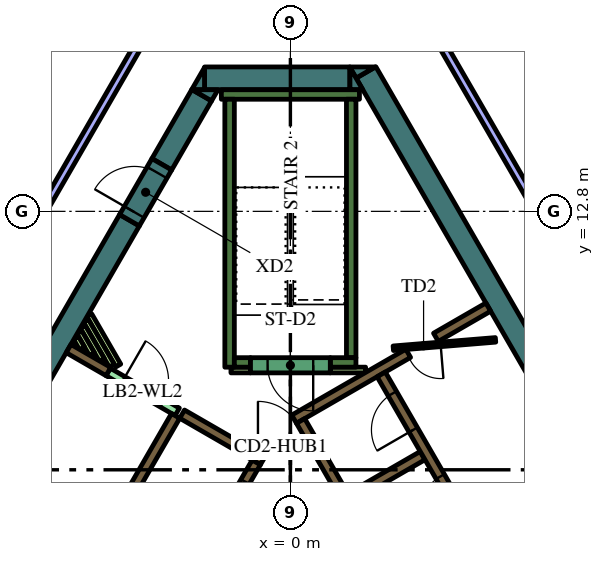
"""IFC4 building model, lengths in metres.
Left out: names, types, materials, properties, quantities, classifications, styles, units other than length and angle.
Written with IfcOpenShell. Run it as: python <this file> out.ifc"""

import sys

from ifc_helpers import new_model, si_unit, direction, frame, frame_2d, origin, place, context, subcontext, project, spatial, polyline, rectangle, outline, extrude, element, fill, save


model = new_model("IFC4")
c1 = context("Model", 3, precision=1e-05, world=origin(), true_north=direction((0.0, 1.0)))
c2 = subcontext(c1, "Body", "Model", "MODEL_VIEW")
j1 = project(units=[si_unit("LENGTHUNIT", "METRE"), si_unit("PLANEANGLEUNIT", "RADIAN")], contexts=[c1])
p1 = place(None, origin())
s1 = spatial("IfcSite", under=j1, at=p1, CompositionType="ELEMENT")
p2 = place(p1, origin())
s2 = spatial("IfcBuilding", under=s1, at=p2, CompositionType="ELEMENT")
p3 = place(p2, frame((0.0, 0.0, 271.2)))
s3 = spatial("IfcBuildingStorey", under=s2, at=p3, CompositionType="ELEMENT", Elevation=271.2)
p4 = place(p3, frame((1.989, 16.456, 0.0), z_axis=(0.0, 0.0, 1.0), x_axis=(0.49999102663, -0.8660305845, 0.0)))
e1 = element("IfcWall", 1, at=p4, inside=s3, PredefinedType="SOLIDWALL", context=c2, shape_type="SweptSolid", body=[
    extrude(rectangle(XDim=12.406, YDim=0.6, at=frame_2d((6.203, 0.0))), origin(), (0.0, 0.0, 1.0), 4.2),
])
p5 = place(p3, origin())
e2 = element("IfcWall", 2, at=p5, inside=s3, PredefinedType="SOLIDWALL", context=c2, shape_type="SweptSolid", body=[
    extrude(outline(polyline([(1.559, 16.6), (2.235, 16.6), (1.728, 16.307), (1.559, 16.6)])), origin(), (0.0, 0.0, 1.0), 4.2),
])
p6 = place(p3, frame((-2.258, 16.3, 0.0), z_axis=(0.0, 0.0, 1.0), x_axis=(1.0, 0.0, 0.0)))
e3 = element("IfcWall", 3, at=p6, inside=s3, PredefinedType="SOLIDWALL", context=c2, shape_type="SweptSolid", body=[
    extrude(rectangle(XDim=3.823, YDim=0.6, at=frame_2d((1.912, 0.0))), origin(), (0.0, 0.0, 1.0), 4.2),
])
e4 = element("IfcWall", 4, at=p5, inside=s3, PredefinedType="SOLIDWALL", context=c2, shape_type="SweptSolid", body=[
    extrude(outline(polyline([(1.905, 16.0), (1.567, 16.0), (1.567, 16.585), (1.905, 16.0)])), origin(), (0.0, 0.0, 1.0), 4.2),
])
e5 = element("IfcWall", 5, at=p5, inside=s3, PredefinedType="SOLIDWALL", context=c2, shape_type="SweptSolid", body=[
    extrude(outline(polyline([(-2.598, 16.0), (-2.26, 16.585), (-2.26, 16.0), (-2.598, 16.0)])), origin(), (0.0, 0.0, 1.0), 4.2),
])
p7 = place(p3, frame((-2.335, 15.855, 0.0), z_axis=(0.0, 0.0, 1.0), x_axis=(-0.499980971027, -0.866036389889, 0.0)))
e6 = element("IfcWall", 6, at=p7, inside=s3, PredefinedType="SOLIDWALL", context=c2, shape_type="SweptSolid", body=[
    extrude(rectangle(XDim=2.098, YDim=0.6, at=frame_2d((1.049, 0.0))), origin(), (0.0, 0.0, 1.0), 4.2),
])
e7 = element("IfcWall", 7, at=p5, inside=s3, PredefinedType="SOLIDWALL", context=c2, shape_type="SweptSolid", body=[
    extrude(outline(polyline([(-1.905, 16.0), (-2.074, 15.707), (-2.581, 16.0), (-1.905, 16.0)])), origin(), (0.0, 0.0, 1.0), 4.2),
])
p8 = place(p3, frame((-4.234, 12.566, 0.0), z_axis=(0.0, 0.0, 1.0), x_axis=(-0.499998841866, -0.866026072432, 0.0)))
e8 = element("IfcWall", 8, at=p8, inside=s3, PredefinedType="SOLIDWALL", context=c2, shape_type="SweptSolid", body=[
    extrude(rectangle(XDim=16.694, YDim=0.6, at=frame_2d((8.347, 0.0))), origin(), (0.0, 0.0, 1.0), 4.2),
])
p9 = place(p3, frame((-1.817, 15.875, 0.0), z_axis=(0.0, 0.0, 1.0), x_axis=(1.0, 0.0, 0.0)))
e9 = element("IfcWall", 9, at=p9, inside=s3, PredefinedType="SOLIDWALL", context=c2, shape_type="SweptSolid", body=[
    extrude(rectangle(XDim=3.634, YDim=0.25, at=frame_2d((1.817, 0.0))), origin(), (0.0, 0.0, 1.0), 4.2),
])
p10 = place(p3, frame((1.6, 8.95, 0.0), z_axis=(0.0, 0.0, 1.0), x_axis=(0.0, 1.0, 0.0)))
e10 = element("IfcWall", 10, at=p10, inside=s3, PredefinedType="SOLIDWALL", context=c2, shape_type="SweptSolid", body=[
    extrude(rectangle(XDim=6.8, YDim=0.25, at=frame_2d((3.4, 0.0))), origin(), (0.0, 0.0, 1.0), 4.2),
])
p11 = place(p3, frame((1.05, 8.825, 0.0), z_axis=(0.0, 0.0, 1.0), x_axis=(1.0, 0.0, 0.0)))
e11 = element("IfcWall", 11, at=p11, inside=s3, PredefinedType="SOLIDWALL", context=c2, shape_type="SweptSolid", body=[
    extrude(rectangle(XDim=0.675, YDim=0.25, at=frame_2d((0.337, 0.0))), origin(), (0.0, 0.0, 1.0), 4.2),
])
p12 = place(p3, frame((-1.6, 8.7, 0.0), z_axis=(0.0, 0.0, 1.0), x_axis=(0.0, 1.0, 0.0)))
e12 = element("IfcWall", 12, at=p12, inside=s3, PredefinedType="SOLIDWALL", context=c2, shape_type="SweptSolid", body=[
    extrude(rectangle(XDim=7.05, YDim=0.25, at=frame_2d((3.525, 0.0))), origin(), (0.0, 0.0, 1.0), 4.2),
])
p13 = place(p3, frame((-1.475, 8.825, 0.0), z_axis=(0.0, 0.0, 1.0), x_axis=(1.0, 0.0, 0.0)))
e13 = element("IfcWall", 13, at=p13, inside=s3, PredefinedType="SOLIDWALL", context=c2, shape_type="SweptSolid", body=[
    extrude(rectangle(XDim=0.425, YDim=0.25, at=frame_2d((0.212, 0.0))), origin(), (0.0, 0.0, 1.0), 4.2),
])
p14 = place(p3, frame((3.1, 9.064, 0.0), z_axis=(0.0, 0.0, 1.0), x_axis=(-0.866033137035, -0.499986605379, 0.0)))
e14 = element("IfcWall", 14, at=p14, inside=s3, PredefinedType="SOLIDWALL", context=c2, shape_type="SweptSolid", body=[
    extrude(rectangle(XDim=3.467, YDim=0.25, at=frame_2d((1.733, 0.0))), origin(), (0.0, 0.0, 1.0), 4.2),
])
p15 = place(p3, frame((0.268, 7.285, 0.0), z_axis=(0.0, 0.0, 1.0), x_axis=(0.500098681536, -0.865968422476, 0.0)))
e15 = element("IfcWall", 15, at=p15, inside=s3, PredefinedType="SOLIDWALL", context=c2, shape_type="SweptSolid", body=[
    extrude(rectangle(XDim=0.636, YDim=0.25, at=frame_2d((0.318, 0.0))), origin(), (0.0, 0.0, 1.0), 4.2),
])
p16 = place(p3, frame((5.97, -2.591, 0.0), z_axis=(0.0, 0.0, 1.0), x_axis=(-0.499994469932, 0.866028596547, 0.0)))
e16 = element("IfcWall", 16, at=p16, inside=s3, PredefinedType="SOLIDWALL", context=c2, shape_type="SweptSolid", body=[
    extrude(rectangle(XDim=10.488, YDim=0.25, at=frame_2d((5.244, 0.0))), origin(), (0.0, 0.0, 1.0), 4.2),
])
p17 = place(p3, frame((1.574, 5.274, 0.0), z_axis=(0.0, 0.0, 1.0), x_axis=(0.866028486751, 0.499994660107, 0.0)))
e17 = element("IfcWall", 17, at=p17, inside=s3, PredefinedType="SOLIDWALL", context=c2, shape_type="SweptSolid", body=[
    extrude(rectangle(XDim=2.2, YDim=0.25, at=frame_2d((1.1, 0.0))), origin(), (0.0, 0.0, 1.0), 4.2),
])
p18 = place(p3, frame((3.83, 9.486, 0.0), z_axis=(0.0, 0.0, 1.0), x_axis=(0.865986202621, 0.500067892261, 0.0)))
e18 = element("IfcWall", 18, at=p18, inside=s3, PredefinedType="SOLIDWALL", context=c2, shape_type="SweptSolid", body=[
    extrude(rectangle(XDim=1.591, YDim=0.25, at=frame_2d((0.795, 0.0))), origin(), (0.0, 0.0, 1.0), 4.2),
])
p19 = place(p3, frame((-3.02, 7.419, 0.0), z_axis=(0.0, 0.0, 1.0), x_axis=(-0.500022956343, -0.866012149528, 0.0)))
e19 = element("IfcWall", 19, at=p19, inside=s3, PredefinedType="SOLIDWALL", context=c2, shape_type="SweptSolid", body=[
    extrude(rectangle(XDim=10.08, YDim=0.25, at=frame_2d((5.04, 0.0))), origin(), (0.0, 0.0, 1.0), 4.2),
])
e20 = element("IfcWall", 20, at=p5, inside=s3, PredefinedType="SOLIDWALL", context=c2, shape_type="SweptSolid", body=[
    extrude(outline(polyline([(-2.912, 7.356), (-2.787, 7.573), (-1.232, 6.675), (-1.303, 6.675), (-1.304, 6.675), (-1.304, 6.675), (-1.304, 6.525), (-1.304, 6.525), (-1.303, 6.525), (-0.971, 6.525), (-0.665, 6.348), (-0.79, 6.132), (-1.007, 6.257), (-1.007, 6.257), (-2.912, 7.356)])), origin(), (0.0, 0.0, 1.0), 4.2),
])
p20 = place(p3, frame((-5.837, 9.19, 0.0), z_axis=(0.0, 0.0, 1.0), x_axis=(0.866024298998, -0.500001913541, 0.0)))
e21 = element("IfcWall", 21, at=p20, inside=s3, PredefinedType="SOLIDWALL", context=c2, shape_type="SweptSolid", body=[
    extrude(rectangle(XDim=1.21, YDim=0.25, at=frame_2d((0.605, 0.0))), origin(), (0.0, 0.0, 1.0), 4.2),
])
p21 = place(p3, frame((-5.294, 10.067, 0.0), z_axis=(0.0, 0.0, 1.0), x_axis=(0.500054140411, -0.865994143547, 0.0)))
e22 = element("IfcWall", 22, at=p21, inside=s3, PredefinedType="PARTITIONING", context=c2, shape_type="SweptSolid", body=[
    extrude(rectangle(XDim=1.529, YDim=0.15, at=frame_2d((0.765, 0.0))), origin(), (0.0, 0.0, 1.0), 3.55),
])
p22 = place(p3, frame((-5.381, 9.917, 0.0), z_axis=(0.0, 0.0, 1.0), x_axis=(0.500136970483, -0.865946309396, 0.0)))
e23 = element("IfcWall", 23, at=p22, inside=s3, PredefinedType="PARTITIONING", context=c2, shape_type="SweptSolid", body=[
    extrude(rectangle(XDim=1.359, YDim=0.15, at=frame_2d((0.68, 0.0))), origin(), (0.0, 0.0, 1.0), 3.55),
])
p23 = place(p3, frame((-5.467, 9.767, 0.0), z_axis=(0.0, 0.0, 1.0), x_axis=(0.500168849293, -0.86592789665, 0.0)))
e24 = element("IfcWall", 24, at=p23, inside=s3, PredefinedType="PARTITIONING", context=c2, shape_type="SweptSolid", body=[
    extrude(rectangle(XDim=1.01, YDim=0.15, at=frame_2d((0.505, 0.0))), origin(), (0.0, 0.0, 1.0), 3.55),
])
p24 = place(p3, frame((-5.554, 9.617, 0.0), z_axis=(0.0, 0.0, 1.0), x_axis=(0.500253084543, -0.86587923604, 0.0)))
e25 = element("IfcWall", 25, at=p24, inside=s3, PredefinedType="PARTITIONING", context=c2, shape_type="SweptSolid", body=[
    extrude(rectangle(XDim=0.664, YDim=0.15, at=frame_2d((0.332, 0.0))), origin(), (0.0, 0.0, 1.0), 3.55),
])
p25 = place(p3, frame((-5.64, 9.467, 0.0), z_axis=(0.0, 0.0, 1.0), x_axis=(0.499944387978, -0.86605750902, 0.0)))
e26 = element("IfcWall", 26, at=p25, inside=s3, PredefinedType="PARTITIONING", context=c2, shape_type="SweptSolid", body=[
    extrude(rectangle(XDim=0.317, YDim=0.15, at=frame_2d((0.159, 0.0))), origin(), (0.0, 0.0, 1.0), 3.55),
])
p26 = place(p3, frame((1.05, 8.625, 0.0), z_axis=(0.0, 0.0, 1.0), x_axis=(1.0, 0.0, 0.0)))
e27 = element("IfcWall", 27, at=p26, inside=s3, PredefinedType="PARTITIONING", context=c2, shape_type="SweptSolid", body=[
    extrude(rectangle(XDim=0.929, YDim=0.15, at=frame_2d((0.464, 0.0))), origin(), (0.0, 0.0, 1.0), 3.55),
])
p27 = place(p3, frame((-1.564, 8.625, 0.0), z_axis=(0.0, 0.0, 1.0), x_axis=(1.0, 0.0, 0.0)))
e28 = element("IfcWall", 28, at=p27, inside=s3, PredefinedType="PARTITIONING", context=c2, shape_type="SweptSolid", body=[
    extrude(rectangle(XDim=0.514, YDim=0.15, at=frame_2d((0.257, 0.0))), origin(), (0.0, 0.0, 1.0), 3.55),
])
p28 = place(p3, frame((8.565, -2.185, 0.0), z_axis=(0.0, 0.0, 1.0), x_axis=(-0.499997954832, 0.866026584559, 0.0)))
e29 = element("IfcWall", 29, at=p28, inside=s3, PredefinedType="SOLIDWALL", context=c2, shape_type="SweptSolid", body=[
    extrude(rectangle(XDim=12.35, YDim=0.25, at=frame_2d((6.175, 0.0))), origin(), (0.0, 0.0, 1.0), 4.2),
])
p29 = place(p28, frame((0.685, 0.0, 0.0)))
e30 = element("IfcOpeningElement", 30, at=p29, cuts=e29, PredefinedType="OPENING", context=c2, shape_type="SweptSolid", body=[
    extrude(rectangle(XDim=0.9, YDim=2.1, at=frame_2d((0.45, 1.05))), frame((0.0, 0.135, 0.0), z_axis=(0.0, -1.0, 0.0), x_axis=(1.0, 0.0, 0.0)), (0.0, 0.0, 1.0), 0.27),
])
p30 = place(p28, frame((3.105, 0.0, 0.0)))
e31 = element("IfcOpeningElement", 31, at=p30, cuts=e29, PredefinedType="OPENING", context=c2, shape_type="SweptSolid", body=[
    extrude(rectangle(XDim=1.1, YDim=2.1, at=frame_2d((0.55, 1.05))), frame((0.0, 0.135, 0.0), z_axis=(0.0, -1.0, 0.0), x_axis=(1.0, 0.0, 0.0)), (0.0, 0.0, 1.0), 0.27),
])
p31 = place(p28, frame((5.625, 0.0, 0.0)))
e32 = element("IfcOpeningElement", 32, at=p31, cuts=e29, PredefinedType="OPENING", context=c2, shape_type="SweptSolid", body=[
    extrude(rectangle(XDim=1.1, YDim=2.1, at=frame_2d((0.55, 1.05))), frame((0.0, 0.135, 0.0), z_axis=(0.0, -1.0, 0.0), x_axis=(1.0, 0.0, 0.0)), (0.0, 0.0, 1.0), 0.27),
])
p32 = place(p28, frame((8.145, 0.0, 0.0)))
e33 = element("IfcOpeningElement", 33, at=p32, cuts=e29, PredefinedType="OPENING", context=c2, shape_type="SweptSolid", body=[
    extrude(rectangle(XDim=1.1, YDim=2.1, at=frame_2d((0.55, 1.05))), frame((0.0, 0.135, 0.0), z_axis=(0.0, -1.0, 0.0), x_axis=(1.0, 0.0, 0.0)), (0.0, 0.0, 1.0), 0.27),
])
p33 = place(p28, frame((10.665, 0.0, 0.0)))
e34 = element("IfcOpeningElement", 34, at=p33, cuts=e29, PredefinedType="OPENING", context=c2, shape_type="SweptSolid", body=[
    extrude(rectangle(XDim=1.1, YDim=2.1, at=frame_2d((0.55, 1.05))), frame((0.0, 0.135, 0.0), z_axis=(0.0, -1.0, 0.0), x_axis=(1.0, 0.0, 0.0)), (0.0, 0.0, 1.0), 0.27),
])
p34 = place(p3, frame((-0.898, 6.194, 0.0), z_axis=(0.0, 0.0, 1.0), x_axis=(-0.499996202215, -0.866027596426, 0.0)))
e35 = element("IfcWall", 35, at=p34, inside=s3, PredefinedType="SOLIDWALL", context=c2, shape_type="SweptSolid", body=[
    extrude(rectangle(XDim=9.83, YDim=0.25, at=frame_2d((4.915, 0.0))), origin(), (0.0, 0.0, 1.0), 4.2),
])
p35 = place(p34, frame((0.585, 0.0, 0.0)))
e36 = element("IfcOpeningElement", 36, at=p35, cuts=e35, PredefinedType="OPENING", context=c2, shape_type="SweptSolid", body=[
    extrude(rectangle(XDim=1.1, YDim=2.1, at=frame_2d((0.55, 1.05))), frame((0.0, 0.135, 0.0), z_axis=(0.0, -1.0, 0.0), x_axis=(1.0, 0.0, 0.0)), (0.0, 0.0, 1.0), 0.27),
])
p36 = place(p34, frame((3.105, 0.0, 0.0)))
e37 = element("IfcOpeningElement", 37, at=p36, cuts=e35, PredefinedType="OPENING", context=c2, shape_type="SweptSolid", body=[
    extrude(rectangle(XDim=1.1, YDim=2.1, at=frame_2d((0.55, 1.05))), frame((0.0, 0.135, 0.0), z_axis=(0.0, -1.0, 0.0), x_axis=(1.0, 0.0, 0.0)), (0.0, 0.0, 1.0), 0.27),
])
p37 = place(p34, frame((5.625, 0.0, 0.0)))
e38 = element("IfcOpeningElement", 38, at=p37, cuts=e35, PredefinedType="OPENING", context=c2, shape_type="SweptSolid", body=[
    extrude(rectangle(XDim=1.1, YDim=2.1, at=frame_2d((0.55, 1.05))), frame((0.0, 0.135, 0.0), z_axis=(0.0, -1.0, 0.0), x_axis=(1.0, 0.0, 0.0)), (0.0, 0.0, 1.0), 0.27),
])
p38 = place(p34, frame((8.145, 0.0, 0.0)))
e39 = element("IfcOpeningElement", 39, at=p38, cuts=e35, PredefinedType="OPENING", context=c2, shape_type="SweptSolid", body=[
    extrude(rectangle(XDim=1.1, YDim=2.1, at=frame_2d((0.55, 1.05))), frame((0.0, 0.135, 0.0), z_axis=(0.0, -1.0, 0.0), x_axis=(1.0, 0.0, 0.0)), (0.0, 0.0, 1.0), 0.27),
])
p39 = place(p3, frame((1.05, 8.75, 0.0), z_axis=(0.0, 0.0, 1.0), x_axis=(-1.0, 0.0, 0.0)))
e40 = element("IfcWall", 40, at=p39, inside=s3, PredefinedType="SOLIDWALL", context=c2, shape_type="SweptSolid", body=[
    extrude(rectangle(XDim=2.1, YDim=0.4, at=frame_2d((1.05, 0.0))), origin(), (0.0, 0.0, 1.0), 4.2),
])
p40 = place(p39, frame((0.45, 0.0, 0.0)))
e41 = element("IfcOpeningElement", 41, at=p40, cuts=e40, PredefinedType="OPENING", context=c2, shape_type="SweptSolid", body=[
    extrude(rectangle(XDim=1.2, YDim=2.1, at=frame_2d((0.6, 1.05))), frame((0.0, 0.21, 0.0), z_axis=(0.0, -1.0, 0.0), x_axis=(1.0, 0.0, 0.0)), (0.0, 0.0, 1.0), 0.42),
])
p41 = place(p3, frame((5.398, 9.419, 0.0), z_axis=(0.0, 0.0, 1.0), x_axis=(-0.996653416376, -0.081743303248, 0.0)))
e42 = element("IfcWall", 42, at=p41, inside=s3, PredefinedType="PARTITIONING", context=c2, shape_type="SweptSolid", body=[
    extrude(rectangle(XDim=2.7, YDim=0.12, at=frame_2d((1.35, 0.0))), origin(), (0.0, 0.0, 1.0), 3.55),
])
p42 = place(p41, frame((1.45, 0.0, 0.0)))
e43 = element("IfcOpeningElement", 43, at=p42, cuts=e42, PredefinedType="OPENING", context=c2, shape_type="SweptSolid", body=[
    extrude(rectangle(XDim=0.9, YDim=2.1, at=frame_2d((0.45, 1.05))), frame((0.0, 0.07, 0.0), z_axis=(0.0, -1.0, 0.0), x_axis=(1.0, 0.0, 0.0)), (0.0, 0.0, 1.0), 0.14),
])
p43 = place(p3, frame((-1.303, 6.6, 0.0), z_axis=(0.0, 0.0, 1.0), x_axis=(1.0, 0.0, 0.0)))
e44 = element("IfcWall", 44, at=p43, inside=s3, PredefinedType="PARTITIONING", context=c2, shape_type="SweptSolid", body=[
    extrude(rectangle(XDim=2.1, YDim=0.15, at=frame_2d((1.05, 0.0))), origin(), (0.0, 0.0, 1.0), 4.2),
])
p44 = place(p43, frame((0.45, 0.0, 0.0)))
e45 = element("IfcOpeningElement", 45, at=p44, cuts=e44, PredefinedType="OPENING", context=c2, shape_type="SweptSolid", body=[
    extrude(rectangle(XDim=1.2, YDim=2.1, at=frame_2d((0.6, 1.05))), frame((0.0, 0.085, 0.0), z_axis=(0.0, -1.0, 0.0), x_axis=(1.0, 0.0, 0.0)), (0.0, 0.0, 1.0), 0.17),
])
p45 = place(p3, frame((-4.796, 8.575, 0.0), z_axis=(0.0, 0.0, 1.0), x_axis=(0.866009402589, -0.500027713859, 0.0)))
e46 = element("IfcWall", 46, at=p45, inside=s3, PredefinedType="PARTITIONING", context=c2, shape_type="SweptSolid", body=[
    extrude(rectangle(XDim=2.1, YDim=0.226, at=frame_2d((1.05, 0.0))), origin(), (0.0, 0.0, 1.0), 3.55),
])
p46 = place(p45, frame((0.45, 0.0, 0.0)))
e47 = element("IfcOpeningElement", 47, at=p46, cuts=e46, PredefinedType="OPENING", context=c2, shape_type="SweptSolid", body=[
    extrude(rectangle(XDim=1.2, YDim=2.1, at=frame_2d((0.6, 1.05))), frame((0.0, 0.123, 0.0), z_axis=(0.0, -1.0, 0.0), x_axis=(1.0, 0.0, 0.0)), (0.0, 0.0, 1.0), 0.246),
])
p47 = place(p3, frame((-4.234, 12.566, 0.0), z_axis=(0.0, 0.0, 1.0), x_axis=(0.500000056704, 0.866025371046, 0.0)))
e48 = element("IfcWall", 48, at=p47, inside=s3, PredefinedType="SOLIDWALL", context=c2, shape_type="SweptSolid", body=[
    extrude(rectangle(XDim=1.7, YDim=0.6, at=frame_2d((0.85, 0.0))), origin(), (0.0, 0.0, 1.0), 4.2),
])
p48 = place(p47, frame((0.25, 0.0, 0.0)))
e49 = element("IfcOpeningElement", 49, at=p48, cuts=e48, PredefinedType="OPENING", context=c2, shape_type="SweptSolid", body=[
    extrude(rectangle(XDim=1.2, YDim=2.1, at=frame_2d((0.6, 1.05))), frame((0.0, 0.31, 0.0), z_axis=(0.0, -1.0, 0.0), x_axis=(1.0, 0.0, 0.0)), (0.0, 0.0, 1.0), 0.62),
])
p49 = place(p3, frame((7.188, 11.65, 0.0), z_axis=(0.0, 0.0, 1.0), x_axis=(-0.499989634868, 0.866031388014, 0.0)))
e50 = element("IfcWall", 50, at=p49, inside=s3, PredefinedType="PARTITIONING", context=c2, shape_type="SweptSolid", body=[
    extrude(rectangle(XDim=7.303, YDim=0.2, at=frame_2d((3.652, 0.0))), origin(), (0.0, 0.0, 1.0), 3.55),
])
p50 = place(p3, frame((-7.962, 15.8, 0.0), z_axis=(0.0, 0.0, 1.0), x_axis=(0.599528135832, 0.800353680785, 0.0)))
e51 = element("IfcWall", 51, at=p50, inside=s3, PredefinedType="PARTITIONING", context=c2, shape_type="SweptSolid", body=[
    extrude(rectangle(XDim=5.217, YDim=0.15, at=frame_2d((2.608, 0.0))), origin(), (0.0, 0.0, 1.0), 3.55),
])
p51 = place(p50, frame((2.116, 0.0, 0.0)))
e52 = element("IfcOpeningElement", 52, at=p51, cuts=e51, PredefinedType="OPENING", context=c2, shape_type="SweptSolid", body=[
    extrude(rectangle(XDim=0.9, YDim=2.1, at=frame_2d((0.45, 1.05))), frame((0.0, 0.085, 0.0), z_axis=(0.0, -1.0, 0.0), x_axis=(1.0, 0.0, 0.0)), (0.0, 0.0, 1.0), 0.17),
])
p52 = place(p3, frame((-3.306, 18.374, 0.0), z_axis=(0.0, 0.0, 1.0), x_axis=(-0.499999798456, -0.866025520146, 0.0)))
e53 = element("IfcWall", 53, at=p52, inside=s3, PredefinedType="PARTITIONING", context=c2, shape_type="SweptSolid", body=[
    extrude(rectangle(XDim=8.229, YDim=0.2, at=frame_2d((4.115, 0.0))), origin(), (0.0, 0.0, 1.0), 3.55),
])
p53 = place(p32, origin())
e54 = element("IfcDoor", 54, at=p53, inside=s3, OperationType="DOUBLE_DOOR_SLIDING", PredefinedType="DOOR", context=c2, shape_type="SweptSolid", body=[
    extrude(rectangle(XDim=1.1, YDim=2.1, at=frame_2d((0.55, 1.05))), frame((0.0, 0.025, 0.0), z_axis=(0.0, -1.0, 0.0), x_axis=(1.0, 0.0, 0.0)), (0.0, 0.0, 1.0), 0.05),
])
fill(e33, e54)
p54 = place(p33, origin())
e55 = element("IfcDoor", 55, at=p54, inside=s3, OperationType="DOUBLE_DOOR_SLIDING", PredefinedType="DOOR", context=c2, shape_type="SweptSolid", body=[
    extrude(rectangle(XDim=1.1, YDim=2.1, at=frame_2d((0.55, 1.05))), frame((0.0, 0.025, 0.0), z_axis=(0.0, -1.0, 0.0), x_axis=(1.0, 0.0, 0.0)), (0.0, 0.0, 1.0), 0.05),
])
fill(e34, e55)
p55 = place(p35, origin())
e56 = element("IfcDoor", 56, at=p55, inside=s3, OperationType="DOUBLE_DOOR_SLIDING", PredefinedType="DOOR", context=c2, shape_type="SweptSolid", body=[
    extrude(rectangle(XDim=1.1, YDim=2.1, at=frame_2d((0.55, 1.05))), frame((0.0, 0.025, 0.0), z_axis=(0.0, -1.0, 0.0), x_axis=(1.0, 0.0, 0.0)), (0.0, 0.0, 1.0), 0.05),
])
fill(e36, e56)
p56 = place(p40, origin())
e57 = element("IfcDoor", 57, at=p56, inside=s3, OperationType="SINGLE_SWING_LEFT", PredefinedType="DOOR", context=c2, shape_type="SweptSolid", body=[
    extrude(rectangle(XDim=1.2, YDim=2.1, at=frame_2d((0.6, 1.05))), frame((0.0, 0.025, 0.0), z_axis=(0.0, -1.0, 0.0), x_axis=(1.0, 0.0, 0.0)), (0.0, 0.0, 1.0), 0.05),
])
fill(e41, e57)
p57 = place(p42, origin())
e58 = element("IfcDoor", 58, at=p57, inside=s3, OperationType="SINGLE_SWING_LEFT", PredefinedType="DOOR", context=c2, shape_type="SweptSolid", body=[
    extrude(rectangle(XDim=0.9, YDim=2.1, at=frame_2d((0.45, 1.05))), frame((0.0, 0.025, 0.0), z_axis=(0.0, -1.0, 0.0), x_axis=(1.0, 0.0, 0.0)), (0.0, 0.0, 1.0), 0.05),
])
fill(e43, e58)
p58 = place(p44, origin())
e59 = element("IfcDoor", 59, at=p58, inside=s3, OperationType="SINGLE_SWING_LEFT", PredefinedType="DOOR", context=c2, shape_type="SweptSolid", body=[
    extrude(rectangle(XDim=1.2, YDim=2.1, at=frame_2d((0.6, 1.05))), frame((0.0, 0.025, 0.0), z_axis=(0.0, -1.0, 0.0), x_axis=(1.0, 0.0, 0.0)), (0.0, 0.0, 1.0), 0.05),
])
fill(e45, e59)
p59 = place(p46, origin())
e60 = element("IfcDoor", 60, at=p59, inside=s3, OperationType="SINGLE_SWING_LEFT", PredefinedType="DOOR", context=c2, shape_type="SweptSolid", body=[
    extrude(rectangle(XDim=1.2, YDim=2.1, at=frame_2d((0.6, 1.05))), frame((0.0, 0.025, 0.0), z_axis=(0.0, -1.0, 0.0), x_axis=(1.0, 0.0, 0.0)), (0.0, 0.0, 1.0), 0.05),
])
fill(e47, e60)
p60 = place(p48, origin())
e61 = element("IfcDoor", 61, at=p60, inside=s3, OperationType="SINGLE_SWING_LEFT", PredefinedType="DOOR", context=c2, shape_type="SweptSolid", body=[
    extrude(rectangle(XDim=1.2, YDim=2.1, at=frame_2d((0.6, 1.05))), frame((0.0, 0.025, 0.0), z_axis=(0.0, -1.0, 0.0), x_axis=(1.0, 0.0, 0.0)), (0.0, 0.0, 1.0), 0.05),
])
fill(e49, e61)
save(model, sys.argv[1])
